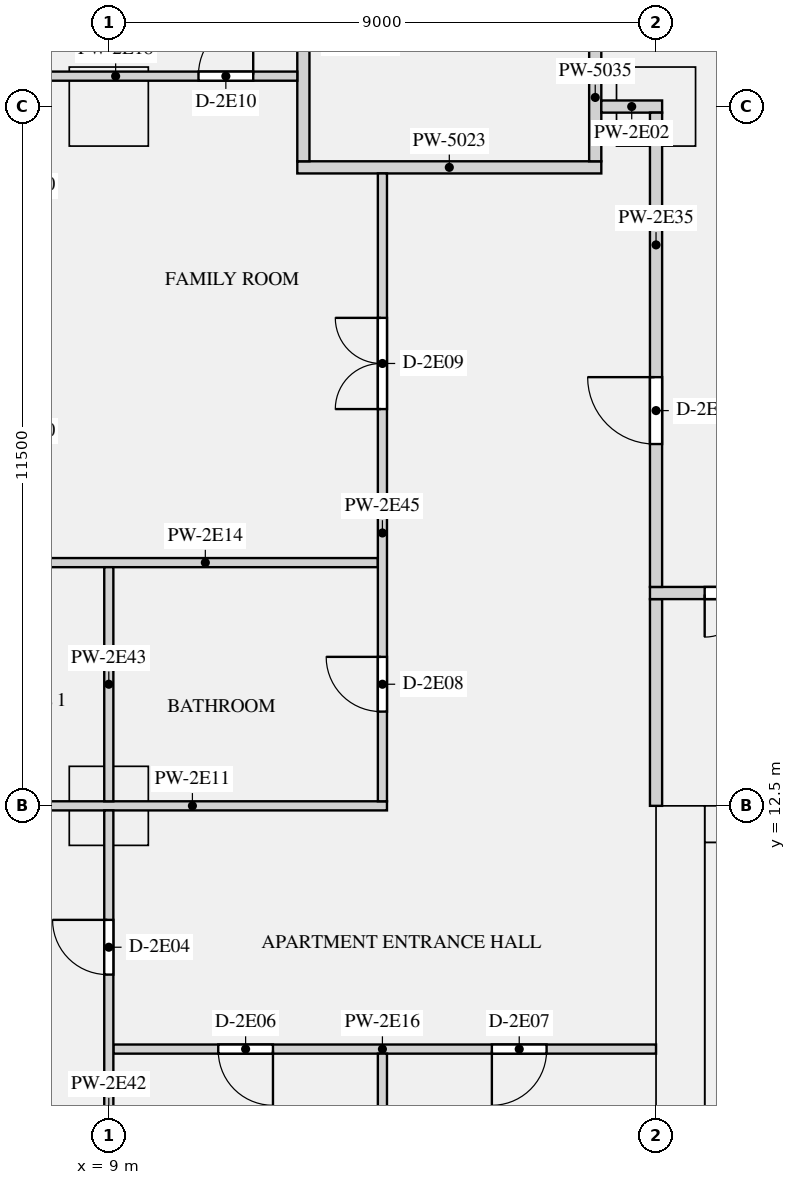
"""IFC4 building model, lengths in metres.
Left out: names, types, materials, properties, quantities, classifications, styles, units other than length and angle.
Written with IfcOpenShell. Run it as: python <this file> out.ifc"""

import sys

from ifc_helpers import new_model, si_unit, direction, frame, frame_2d, origin, origin_2d, place, context, subcontext, project, spatial, rectangle, extrude, element, fill, save


model = new_model("IFC4")
c1 = context("Model", 3, precision=1e-05, world=origin(), true_north=direction((0.0, 1.0)))
c2 = subcontext(c1, "Body", "Model", "MODEL_VIEW")
j1 = project(units=[si_unit("LENGTHUNIT", "METRE"), si_unit("PLANEANGLEUNIT", "RADIAN")], contexts=[c1])
p1 = place(None, origin())
s1 = spatial("IfcSite", under=j1, at=p1, CompositionType="ELEMENT")
p2 = place(p1, origin())
s2 = spatial("IfcBuilding", under=s1, at=p2, CompositionType="ELEMENT")
p3 = place(p2, frame((0.0, 0.0, 118.2)))
s3 = spatial("IfcBuildingStorey", under=s2, at=p3, CompositionType="ELEMENT", Elevation=118.2)
for number, where, z_axis, x_axis in (
    (1, (9.0, 24.0, 0.0), (0.0, 0.0, 1.0), (1.0, 0.0, 0.0)),
    (2, (18.0, 24.0, 0.0), (0.0, 0.0, 1.0), (1.0, 0.0, 0.0)),
    (3, (9.0, 12.5, 0.0), (0.0, 0.0, 1.0), (1.0, 0.0, 0.0)),
):
    element("IfcColumn", number, at=place(p3, frame(where, z_axis=z_axis, x_axis=x_axis)), inside=s3, PredefinedType="COLUMN", context=c2, shape_type="SweptSolid", body=[
        extrude(rectangle(XDim=1.3, YDim=1.3, at=origin_2d()), origin(), (0.0, 0.0, 1.0), 3.15),
    ])
p4 = place(p3, frame((18.4, 0.0, 0.0), z_axis=(0.0, 0.0, 1.0), x_axis=(0.0, 1.0, 0.0)))
e4 = element("IfcWall", 4, at=p4, inside=s3, PredefinedType="SHEAR", context=c2, shape_type="SweptSolid", body=[
    extrude(rectangle(XDim=12.5, YDim=0.8, at=frame_2d((6.25, 0.0))), origin(), (0.0, 0.0, 1.0), 3.15),
])
p5 = place(p3, frame((18.8, 12.2, 0.0), z_axis=(0.0, 0.0, 1.0), x_axis=(1.0, 0.0, 0.0)))
e5 = element("IfcWall", 5, at=p5, inside=s3, PredefinedType="SHEAR", context=c2, shape_type="SweptSolid", body=[
    extrude(rectangle(XDim=34.4, YDim=0.6, at=frame_2d((17.2, 0.0))), origin(), (0.0, 0.0, 1.0), 3.15),
])
p6 = place(p5, frame((24.375, 0.0, 0.0)))
e6 = element("IfcOpeningElement", 6, at=p6, cuts=e5, PredefinedType="OPENING", context=c2, shape_type="SweptSolid", body=[
    extrude(rectangle(XDim=1.1, YDim=2.1, at=frame_2d((0.55, 1.05))), frame((0.0, 0.31, 0.0), z_axis=(0.0, -1.0, 0.0), x_axis=(1.0, 0.0, 0.0)), (0.0, 0.0, 1.0), 0.62),
])
p7 = place(p5, frame((26.625, 0.0, 0.0)))
e7 = element("IfcOpeningElement", 7, at=p7, cuts=e5, PredefinedType="OPENING", context=c2, shape_type="SweptSolid", body=[
    extrude(rectangle(XDim=1.1, YDim=2.1, at=frame_2d((0.55, 1.05))), frame((0.0, 0.31, 0.0), z_axis=(0.0, -1.0, 0.0), x_axis=(1.0, 0.0, 0.0)), (0.0, 0.0, 1.0), 0.62),
])
p8 = place(p5, frame((28.875, 0.0, 0.0)))
e8 = element("IfcOpeningElement", 8, at=p8, cuts=e5, PredefinedType="OPENING", context=c2, shape_type="SweptSolid", body=[
    extrude(rectangle(XDim=1.1, YDim=2.1, at=frame_2d((0.55, 1.05))), frame((0.0, 0.31, 0.0), z_axis=(0.0, -1.0, 0.0), x_axis=(1.0, 0.0, 0.0)), (0.0, 0.0, 1.0), 0.62),
])
p9 = place(p5, frame((11.75, 0.0, 0.0)))
e9 = element("IfcOpeningElement", 9, at=p9, cuts=e5, PredefinedType="OPENING", context=c2, shape_type="SweptSolid", body=[
    extrude(rectangle(XDim=0.9, YDim=2.1, at=frame_2d((0.45, 1.05))), frame((0.0, 0.31, 0.0), z_axis=(0.0, -1.0, 0.0), x_axis=(1.0, 0.0, 0.0)), (0.0, 0.0, 1.0), 0.62),
])
p10 = place(p5, frame((18.25, 0.0, 0.0)))
e10 = element("IfcOpeningElement", 10, at=p10, cuts=e5, PredefinedType="OPENING", context=c2, shape_type="SweptSolid", body=[
    extrude(rectangle(XDim=0.9, YDim=2.1, at=frame_2d((0.45, 1.05))), frame((0.0, 0.31, 0.0), z_axis=(0.0, -1.0, 0.0), x_axis=(1.0, 0.0, 0.0)), (0.0, 0.0, 1.0), 0.62),
])
p11 = place(p5, frame((1.35, 0.0, 0.0)))
e11 = element("IfcOpeningElement", 11, at=p11, cuts=e5, PredefinedType="OPENING", context=c2, shape_type="SweptSolid", body=[
    extrude(rectangle(XDim=1.2, YDim=2.1, at=frame_2d((0.6, 1.05))), frame((0.0, 0.31, 0.0), z_axis=(0.0, -1.0, 0.0), x_axis=(1.0, 0.0, 0.0)), (0.0, 0.0, 1.0), 0.62),
])
p12 = place(p5, frame((31.85, 0.0, 0.0)))
e12 = element("IfcOpeningElement", 12, at=p12, cuts=e5, PredefinedType="OPENING", context=c2, shape_type="SweptSolid", body=[
    extrude(rectangle(XDim=1.2, YDim=2.1, at=frame_2d((0.6, 1.05))), frame((0.0, 0.31, 0.0), z_axis=(0.0, -1.0, 0.0), x_axis=(1.0, 0.0, 0.0)), (0.0, 0.0, 1.0), 0.62),
])
p13 = place(p3, frame((18.9, 1.0, 0.0), z_axis=(0.0, 0.0, 1.0), x_axis=(0.0, 1.0, 0.0)))
e13 = element("IfcWall", 13, at=p13, inside=s3, PredefinedType="SHEAR", context=c2, shape_type="SweptSolid", body=[
    extrude(rectangle(XDim=10.9, YDim=0.2, at=frame_2d((5.45, 0.0))), origin(), (0.0, 0.0, 1.0), 3.15),
])
p14 = place(p3, frame((12.1, 23.0, 0.0), z_axis=(0.0, 0.0, 1.0), x_axis=(1.0, 0.0, 0.0)))
e14 = element("IfcWall", 14, at=p14, inside=s3, PredefinedType="PARTITIONING", context=c2, shape_type="SweptSolid", body=[
    extrude(rectangle(XDim=5.0, YDim=0.2, at=frame_2d((2.5, 0.0))), origin(), (0.0, 0.0, 1.0), 2.83),
])
p15 = place(p3, frame((18.0, 12.5, 0.0), z_axis=(0.0, 0.0, 1.0), x_axis=(0.0, 1.0, 0.0)))
e15 = element("IfcWall", 15, at=p15, inside=s3, PredefinedType="PARTITIONING", context=c2, shape_type="SweptSolid", body=[
    extrude(rectangle(XDim=3.4, YDim=0.2, at=frame_2d((1.7, 0.0))), origin(), (0.0, 0.0, 1.0), 2.83),
])
p16 = place(p3, frame((12.2, 23.1, 0.0), z_axis=(0.0, 0.0, 1.0), x_axis=(0.0, 1.0, 0.0)))
e16 = element("IfcWall", 16, at=p16, inside=s3, PredefinedType="PARTITIONING", context=c2, shape_type="SweptSolid", body=[
    extrude(rectangle(XDim=3.9, YDim=0.2, at=frame_2d((1.95, 0.0))), origin(), (0.0, 0.0, 1.0), 2.83),
])
p17 = place(p3, frame((17.0, 23.1, 0.0), z_axis=(0.0, 0.0, 1.0), x_axis=(0.0, 1.0, 0.0)))
e17 = element("IfcWall", 17, at=p17, inside=s3, PredefinedType="PARTITIONING", context=c2, shape_type="SweptSolid", body=[
    extrude(rectangle(XDim=3.8, YDim=0.2, at=frame_2d((1.9, 0.0))), origin(), (0.0, 0.0, 1.0), 2.83),
])
p18 = place(p17, frame((2.1, 0.0, 0.0)))
e18 = element("IfcOpeningElement", 18, at=p18, cuts=e17, PredefinedType="OPENING", context=c2, shape_type="SweptSolid", body=[
    extrude(rectangle(XDim=1.2, YDim=2.1, at=frame_2d((0.6, 1.05))), frame((0.0, 0.11, 0.0), z_axis=(0.0, -1.0, 0.0), x_axis=(1.0, 0.0, 0.0)), (0.0, 0.0, 1.0), 0.22),
])
p19 = place(p3, frame((17.1, 24.0, 0.0), z_axis=(0.0, 0.0, 1.0), x_axis=(1.0, 0.0, 0.0)))
e19 = element("IfcWall", 19, at=p19, inside=s3, PredefinedType="PARTITIONING", context=c2, shape_type="SweptSolid", body=[
    extrude(rectangle(XDim=1.0, YDim=0.2, at=frame_2d((0.5, 0.0))), origin(), (0.0, 0.0, 1.0), 2.83),
])
p20 = place(p3, frame((5.25, 12.5, 0.0), z_axis=(0.0, 0.0, 1.0), x_axis=(1.0, 0.0, 0.0)))
e20 = element("IfcWall", 20, at=p20, inside=s3, PredefinedType="PARTITIONING", context=c2, shape_type="SweptSolid", body=[
    extrude(rectangle(XDim=8.325, YDim=0.15, at=frame_2d((4.163, 0.0))), origin(), (0.0, 0.0, 1.0), 2.83),
])
p21 = place(p20, frame((1.025, 0.0, 0.0)))
e21 = element("IfcOpeningElement", 21, at=p21, cuts=e20, PredefinedType="OPENING", context=c2, shape_type="SweptSolid", body=[
    extrude(rectangle(XDim=0.9, YDim=2.1, at=frame_2d((0.45, 1.05))), frame((0.0, 0.085, 0.0), z_axis=(0.0, -1.0, 0.0), x_axis=(1.0, 0.0, 0.0)), (0.0, 0.0, 1.0), 0.17),
])
p22 = place(p3, frame((7.75, 16.5, 0.0), z_axis=(0.0, 0.0, 1.0), x_axis=(1.0, 0.0, 0.0)))
e22 = element("IfcWall", 22, at=p22, inside=s3, PredefinedType="PARTITIONING", context=c2, shape_type="SweptSolid", body=[
    extrude(rectangle(XDim=5.675, YDim=0.15, at=frame_2d((2.837, 0.0))), origin(), (0.0, 0.0, 1.0), 2.83),
])
p23 = place(p3, frame((9.075, 8.5, 0.0), z_axis=(0.0, 0.0, 1.0), x_axis=(1.0, 0.0, 0.0)))
e23 = element("IfcWall", 23, at=p23, inside=s3, PredefinedType="PARTITIONING", context=c2, shape_type="SweptSolid", body=[
    extrude(rectangle(XDim=8.925, YDim=0.15, at=frame_2d((4.462, 0.0))), origin(), (0.0, 0.0, 1.0), 2.83),
])
p24 = place(p23, frame((1.725, 0.0, 0.0)))
e24 = element("IfcOpeningElement", 24, at=p24, cuts=e23, PredefinedType="OPENING", context=c2, shape_type="SweptSolid", body=[
    extrude(rectangle(XDim=0.9, YDim=2.1, at=frame_2d((0.45, 1.05))), frame((0.0, 0.085, 0.0), z_axis=(0.0, -1.0, 0.0), x_axis=(1.0, 0.0, 0.0)), (0.0, 0.0, 1.0), 0.17),
])
p25 = place(p23, frame((6.225, 0.0, 0.0)))
e25 = element("IfcOpeningElement", 25, at=p25, cuts=e23, PredefinedType="OPENING", context=c2, shape_type="SweptSolid", body=[
    extrude(rectangle(XDim=0.9, YDim=2.1, at=frame_2d((0.45, 1.05))), frame((0.0, 0.085, 0.0), z_axis=(0.0, -1.0, 0.0), x_axis=(1.0, 0.0, 0.0)), (0.0, 0.0, 1.0), 0.17),
])
p26 = place(p3, frame((7.75, 24.5, 0.0), z_axis=(0.0, 0.0, 1.0), x_axis=(1.0, 0.0, 0.0)))
e26 = element("IfcWall", 26, at=p26, inside=s3, PredefinedType="PARTITIONING", context=c2, shape_type="SweptSolid", body=[
    extrude(rectangle(XDim=4.35, YDim=0.15, at=frame_2d((2.175, 0.0))), origin(), (0.0, 0.0, 1.0), 2.83),
])
p27 = place(p26, frame((2.725, 0.0, 0.0)))
e27 = element("IfcOpeningElement", 27, at=p27, cuts=e26, PredefinedType="OPENING", context=c2, shape_type="SweptSolid", body=[
    extrude(rectangle(XDim=0.9, YDim=2.1, at=frame_2d((0.45, 1.05))), frame((0.0, 0.085, 0.0), z_axis=(0.0, -1.0, 0.0), x_axis=(1.0, 0.0, 0.0)), (0.0, 0.0, 1.0), 0.17),
])
p28 = place(p3, frame((17.9, 16.0, 0.0), z_axis=(0.0, 0.0, 1.0), x_axis=(1.0, 0.0, 0.0)))
e28 = element("IfcWall", 28, at=p28, inside=s3, PredefinedType="PARTITIONING", context=c2, shape_type="SweptSolid", body=[
    extrude(rectangle(XDim=36.2, YDim=0.2, at=frame_2d((18.1, 0.0))), origin(), (0.0, 0.0, 1.0), 2.83),
])
p29 = place(p28, frame((0.9, 0.0, 0.0)))
e29 = element("IfcOpeningElement", 29, at=p29, cuts=e28, PredefinedType="OPENING", context=c2, shape_type="SweptSolid", body=[
    extrude(rectangle(XDim=1.4, YDim=2.1, at=frame_2d((0.7, 1.05))), frame((0.0, 0.11, 0.0), z_axis=(0.0, -1.0, 0.0), x_axis=(1.0, 0.0, 0.0)), (0.0, 0.0, 1.0), 0.22),
])
p30 = place(p28, frame((33.9, 0.0, 0.0)))
e30 = element("IfcOpeningElement", 30, at=p30, cuts=e28, PredefinedType="OPENING", context=c2, shape_type="SweptSolid", body=[
    extrude(rectangle(XDim=1.4, YDim=2.1, at=frame_2d((0.7, 1.05))), frame((0.0, 0.11, 0.0), z_axis=(0.0, -1.0, 0.0), x_axis=(1.0, 0.0, 0.0)), (0.0, 0.0, 1.0), 0.22),
])
p31 = place(p3, frame((18.0, 16.1, 0.0), z_axis=(0.0, 0.0, 1.0), x_axis=(0.0, 1.0, 0.0)))
e31 = element("IfcWall", 31, at=p31, inside=s3, PredefinedType="PARTITIONING", context=c2, shape_type="SweptSolid", body=[
    extrude(rectangle(XDim=7.8, YDim=0.2, at=frame_2d((3.9, 0.0))), origin(), (0.0, 0.0, 1.0), 2.83),
])
p32 = place(p31, frame((2.35, 0.0, 0.0)))
e32 = element("IfcOpeningElement", 32, at=p32, cuts=e31, PredefinedType="OPENING", context=c2, shape_type="SweptSolid", body=[
    extrude(rectangle(XDim=1.1, YDim=2.1, at=frame_2d((0.55, 1.05))), frame((0.0, 0.11, 0.0), z_axis=(0.0, -1.0, 0.0), x_axis=(1.0, 0.0, 0.0)), (0.0, 0.0, 1.0), 0.22),
])
p33 = place(p3, frame((9.0, 5.25, 0.0), z_axis=(0.0, 0.0, 1.0), x_axis=(0.0, 1.0, 0.0)))
e33 = element("IfcWall", 33, at=p33, inside=s3, PredefinedType="PARTITIONING", context=c2, shape_type="SweptSolid", body=[
    extrude(rectangle(XDim=7.175, YDim=0.15, at=frame_2d((3.587, 0.0))), origin(), (0.0, 0.0, 1.0), 2.83),
])
p34 = place(p33, frame((4.475, 0.0, 0.0)))
e34 = element("IfcOpeningElement", 34, at=p34, cuts=e33, PredefinedType="OPENING", context=c2, shape_type="SweptSolid", body=[
    extrude(rectangle(XDim=0.9, YDim=2.1, at=frame_2d((0.45, 1.05))), frame((0.0, 0.085, 0.0), z_axis=(0.0, -1.0, 0.0), x_axis=(1.0, 0.0, 0.0)), (0.0, 0.0, 1.0), 0.17),
])
p35 = place(p3, frame((9.0, 12.575, 0.0), z_axis=(0.0, 0.0, 1.0), x_axis=(0.0, 1.0, 0.0)))
e35 = element("IfcWall", 35, at=p35, inside=s3, PredefinedType="PARTITIONING", context=c2, shape_type="SweptSolid", body=[
    extrude(rectangle(XDim=3.85, YDim=0.15, at=frame_2d((1.925, 0.0))), origin(), (0.0, 0.0, 1.0), 2.83),
])
p36 = place(p3, frame((13.5, 0.75, 0.0), z_axis=(0.0, 0.0, 1.0), x_axis=(0.0, 1.0, 0.0)))
e36 = element("IfcWall", 36, at=p36, inside=s3, PredefinedType="PARTITIONING", context=c2, shape_type="SweptSolid", body=[
    extrude(rectangle(XDim=7.675, YDim=0.15, at=frame_2d((3.837, 0.0))), origin(), (0.0, 0.0, 1.0), 2.83),
])
p37 = place(p3, frame((13.5, 12.575, 0.0), z_axis=(0.0, 0.0, 1.0), x_axis=(0.0, 1.0, 0.0)))
e37 = element("IfcWall", 37, at=p37, inside=s3, PredefinedType="PARTITIONING", context=c2, shape_type="SweptSolid", body=[
    extrude(rectangle(XDim=10.325, YDim=0.15, at=frame_2d((5.163, 0.0))), origin(), (0.0, 0.0, 1.0), 2.83),
])
p38 = place(p37, frame((1.475, 0.0, 0.0)))
e38 = element("IfcOpeningElement", 38, at=p38, cuts=e37, PredefinedType="OPENING", context=c2, shape_type="SweptSolid", body=[
    extrude(rectangle(XDim=0.9, YDim=2.1, at=frame_2d((0.45, 1.05))), frame((0.0, 0.085, 0.0), z_axis=(0.0, -1.0, 0.0), x_axis=(1.0, 0.0, 0.0)), (0.0, 0.0, 1.0), 0.17),
])
p39 = place(p37, frame((6.45, 0.0, 0.0)))
e39 = element("IfcOpeningElement", 39, at=p39, cuts=e37, PredefinedType="OPENING", context=c2, shape_type="SweptSolid", body=[
    extrude(rectangle(XDim=1.5, YDim=2.1, at=frame_2d((0.75, 1.05))), frame((0.0, 0.085, 0.0), z_axis=(0.0, -1.0, 0.0), x_axis=(1.0, 0.0, 0.0)), (0.0, 0.0, 1.0), 0.17),
])
p40 = place(p29, frame((1.4, 0.0, 0.0), z_axis=(0.0, 0.0, 1.0), x_axis=(-1.0, 0.0, 0.0)))
e40 = element("IfcDoor", 40, at=p40, inside=s3, OperationType="DOUBLE_DOOR_SINGLE_SWING", PredefinedType="DOOR", context=c2, shape_type="SweptSolid", body=[
    extrude(rectangle(XDim=1.4, YDim=2.1, at=frame_2d((0.7, 1.05))), frame((0.0, 0.025, 0.0), z_axis=(0.0, -1.0, 0.0), x_axis=(1.0, 0.0, 0.0)), (0.0, 0.0, 1.0), 0.05),
])
fill(e29, e40)
p41 = place(p32, origin())
e41 = element("IfcDoor", 41, at=p41, inside=s3, OperationType="SINGLE_SWING_RIGHT", PredefinedType="DOOR", context=c2, shape_type="SweptSolid", body=[
    extrude(rectangle(XDim=1.1, YDim=2.1, at=frame_2d((0.55, 1.05))), frame((0.0, 0.025, 0.0), z_axis=(0.0, -1.0, 0.0), x_axis=(1.0, 0.0, 0.0)), (0.0, 0.0, 1.0), 0.05),
])
fill(e32, e41)
p42 = place(p34, origin())
e42 = element("IfcDoor", 42, at=p42, inside=s3, OperationType="SINGLE_SWING_RIGHT", PredefinedType="DOOR", context=c2, shape_type="SweptSolid", body=[
    extrude(rectangle(XDim=0.9, YDim=2.1, at=frame_2d((0.45, 1.05))), frame((0.0, 0.025, 0.0), z_axis=(0.0, -1.0, 0.0), x_axis=(1.0, 0.0, 0.0)), (0.0, 0.0, 1.0), 0.05),
])
fill(e34, e42)
p43 = place(p24, frame((0.9, 0.0, 0.0), z_axis=(0.0, 0.0, 1.0), x_axis=(-1.0, 0.0, 0.0)))
e43 = element("IfcDoor", 43, at=p43, inside=s3, OperationType="SINGLE_SWING_LEFT", PredefinedType="DOOR", context=c2, shape_type="SweptSolid", body=[
    extrude(rectangle(XDim=0.9, YDim=2.1, at=frame_2d((0.45, 1.05))), frame((0.0, 0.025, 0.0), z_axis=(0.0, -1.0, 0.0), x_axis=(1.0, 0.0, 0.0)), (0.0, 0.0, 1.0), 0.05),
])
fill(e24, e43)
p44 = place(p25, frame((0.9, 0.0, 0.0), z_axis=(0.0, 0.0, 1.0), x_axis=(-1.0, 0.0, 0.0)))
e44 = element("IfcDoor", 44, at=p44, inside=s3, OperationType="SINGLE_SWING_RIGHT", PredefinedType="DOOR", context=c2, shape_type="SweptSolid", body=[
    extrude(rectangle(XDim=0.9, YDim=2.1, at=frame_2d((0.45, 1.05))), frame((0.0, 0.025, 0.0), z_axis=(0.0, -1.0, 0.0), x_axis=(1.0, 0.0, 0.0)), (0.0, 0.0, 1.0), 0.05),
])
fill(e25, e44)
p45 = place(p38, origin())
e45 = element("IfcDoor", 45, at=p45, inside=s3, OperationType="SINGLE_SWING_RIGHT", PredefinedType="DOOR", context=c2, shape_type="SweptSolid", body=[
    extrude(rectangle(XDim=0.9, YDim=2.1, at=frame_2d((0.45, 1.05))), frame((0.0, 0.025, 0.0), z_axis=(0.0, -1.0, 0.0), x_axis=(1.0, 0.0, 0.0)), (0.0, 0.0, 1.0), 0.05),
])
fill(e38, e45)
p46 = place(p39, origin())
e46 = element("IfcDoor", 46, at=p46, inside=s3, OperationType="DOUBLE_DOOR_SINGLE_SWING", PredefinedType="DOOR", context=c2, shape_type="SweptSolid", body=[
    extrude(rectangle(XDim=1.5, YDim=2.1, at=frame_2d((0.75, 1.05))), frame((0.0, 0.025, 0.0), z_axis=(0.0, -1.0, 0.0), x_axis=(1.0, 0.0, 0.0)), (0.0, 0.0, 1.0), 0.05),
])
fill(e39, e46)
p47 = place(p27, origin())
e47 = element("IfcDoor", 47, at=p47, inside=s3, OperationType="SINGLE_SWING_RIGHT", PredefinedType="DOOR", context=c2, shape_type="SweptSolid", body=[
    extrude(rectangle(XDim=0.9, YDim=2.1, at=frame_2d((0.45, 1.05))), frame((0.0, 0.025, 0.0), z_axis=(0.0, -1.0, 0.0), x_axis=(1.0, 0.0, 0.0)), (0.0, 0.0, 1.0), 0.05),
])
fill(e27, e47)
save(model, sys.argv[1])
